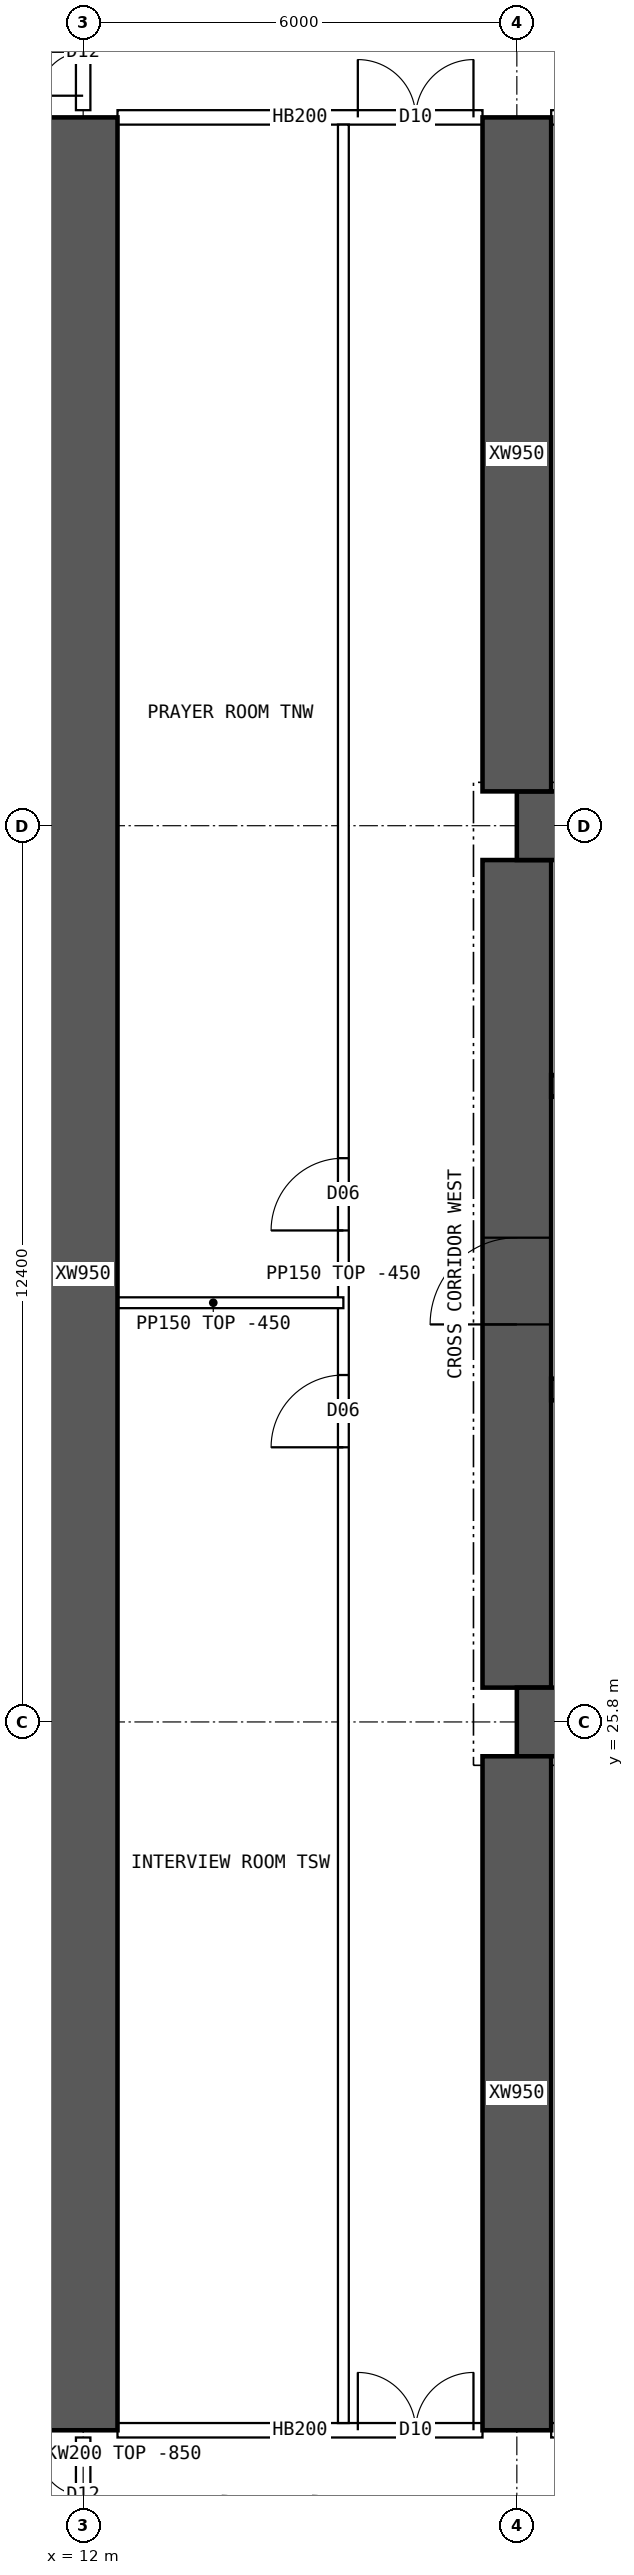
"""IFC4 building model, lengths in metres.
Left out: names, types, materials, properties, quantities, classifications, styles, units other than length and angle.
Written with IfcOpenShell. Run it as: python <this file> out.ifc"""

import sys

from ifc_helpers import new_model, si_unit, direction, frame, frame_2d, origin, place, context, subcontext, project, spatial, polyline, rectangle, outline, extrude, element, fill, save


model = new_model("IFC4")
c1 = context("Model", 3, precision=1e-05, world=origin(), true_north=direction((0.0, 1.0)))
c2 = subcontext(c1, "Body", "Model", "MODEL_VIEW")
j1 = project(units=[si_unit("LENGTHUNIT", "METRE"), si_unit("PLANEANGLEUNIT", "RADIAN")], contexts=[c1])
p1 = place(None, origin())
s1 = spatial("IfcSite", under=j1, at=p1, CompositionType="ELEMENT")
p2 = place(p1, origin())
s2 = spatial("IfcBuilding", under=s1, at=p2, CompositionType="ELEMENT")
p3 = place(p2, frame((0.0, 0.0, 80.65)))
s3 = spatial("IfcBuildingStorey", under=s2, at=p3, CompositionType="ELEMENT", Elevation=80.65)
for number, where, z_axis, x_axis in (
    (1, (18.0, 25.8, 0.0), (0.0, 0.0, 1.0), (1.0, 0.0, 0.0)),
    (2, (18.0, 38.2, 0.0), (0.0, 0.0, 1.0), (1.0, 0.0, 0.0)),
):
    element("IfcWall", number, at=place(p3, frame(where, z_axis=z_axis, x_axis=x_axis)), inside=s3, PredefinedType="SHEAR", context=c2, shape_type="SweptSolid", body=[
        extrude(rectangle(XDim=48.0, YDim=0.95, at=frame_2d((24.0, 0.0))), origin(), (0.0, 0.0, 1.0), 3.75),
    ])
p4 = place(p3, frame((18.0, 26.275, 0.0), z_axis=(0.0, 0.0, 1.0), x_axis=(0.0, 1.0, 0.0)))
e3 = element("IfcWall", 3, at=p4, inside=s3, PredefinedType="SHEAR", context=c2, shape_type="SweptSolid", body=[
    extrude(rectangle(XDim=11.45, YDim=0.95, at=frame_2d((5.725, 0.0))), origin(), (0.0, 0.0, 1.0), 3.75),
])
p5 = place(p4, frame((5.025, 0.0, 0.0)))
e4 = element("IfcOpeningElement", 4, at=p5, cuts=e3, PredefinedType="OPENING", context=c2, shape_type="SweptSolid", body=[
    extrude(rectangle(XDim=1.2, YDim=2.1, at=frame_2d((0.6, 1.05))), frame((0.0, 0.485, 0.0), z_axis=(0.0, -1.0, 0.0), x_axis=(1.0, 0.0, 0.0)), (0.0, 0.0, 1.0), 0.97),
])
p6 = place(p3, frame((18.475, 30.4, 0.0), z_axis=(0.0, 0.0, 1.0), x_axis=(1.0, 0.0, 0.0)))
e5 = element("IfcWall", 5, at=p6, inside=s3, PredefinedType="SHEAR", context=c2, shape_type="SweptSolid", body=[
    extrude(rectangle(XDim=47.05, YDim=0.3, at=frame_2d((23.525, 0.0))), origin(), (0.0, 0.0, 1.0), 3.75),
])
p7 = place(p6, frame((0.4, 0.0, 0.0)))
e6 = element("IfcOpeningElement", 6, at=p7, cuts=e5, PredefinedType="OPENING", context=c2, shape_type="SweptSolid", body=[
    extrude(rectangle(XDim=1.0, YDim=2.1, at=frame_2d((0.5, 1.05))), frame((0.0, 0.16, 0.0), z_axis=(0.0, -1.0, 0.0), x_axis=(1.0, 0.0, 0.0)), (0.0, 0.0, 1.0), 0.32),
])
p8 = place(p6, frame((45.65, 0.0, 0.0)))
e7 = element("IfcOpeningElement", 7, at=p8, cuts=e5, PredefinedType="OPENING", context=c2, shape_type="SweptSolid", body=[
    extrude(rectangle(XDim=1.0, YDim=2.1, at=frame_2d((0.5, 1.05))), frame((0.0, 0.16, 0.0), z_axis=(0.0, -1.0, 0.0), x_axis=(1.0, 0.0, 0.0)), (0.0, 0.0, 1.0), 0.32),
])
p9 = place(p6, frame((8.275, 0.0, 0.0)))
e8 = element("IfcOpeningElement", 8, at=p9, cuts=e5, PredefinedType="OPENING", context=c2, shape_type="SweptSolid", body=[
    extrude(rectangle(XDim=1.1, YDim=2.1, at=frame_2d((0.55, 1.05))), frame((0.0, 0.16, 0.0), z_axis=(0.0, -1.0, 0.0), x_axis=(1.0, 0.0, 0.0)), (0.0, 0.0, 1.0), 0.32),
])
p10 = place(p6, frame((10.875, 0.0, 0.0)))
e9 = element("IfcOpeningElement", 9, at=p10, cuts=e5, PredefinedType="OPENING", context=c2, shape_type="SweptSolid", body=[
    extrude(rectangle(XDim=1.1, YDim=2.1, at=frame_2d((0.55, 1.05))), frame((0.0, 0.16, 0.0), z_axis=(0.0, -1.0, 0.0), x_axis=(1.0, 0.0, 0.0)), (0.0, 0.0, 1.0), 0.32),
])
p11 = place(p6, frame((13.475, 0.0, 0.0)))
e10 = element("IfcOpeningElement", 10, at=p11, cuts=e5, PredefinedType="OPENING", context=c2, shape_type="SweptSolid", body=[
    extrude(rectangle(XDim=1.1, YDim=2.1, at=frame_2d((0.55, 1.05))), frame((0.0, 0.16, 0.0), z_axis=(0.0, -1.0, 0.0), x_axis=(1.0, 0.0, 0.0)), (0.0, 0.0, 1.0), 0.32),
])
p12 = place(p6, frame((16.075, 0.0, 0.0)))
e11 = element("IfcOpeningElement", 11, at=p12, cuts=e5, PredefinedType="OPENING", context=c2, shape_type="SweptSolid", body=[
    extrude(rectangle(XDim=1.1, YDim=2.1, at=frame_2d((0.55, 1.05))), frame((0.0, 0.16, 0.0), z_axis=(0.0, -1.0, 0.0), x_axis=(1.0, 0.0, 0.0)), (0.0, 0.0, 1.0), 0.32),
])
p13 = place(p6, frame((30.142, 0.0, 0.0)))
e12 = element("IfcOpeningElement", 12, at=p13, cuts=e5, PredefinedType="OPENING", context=c2, shape_type="SweptSolid", body=[
    extrude(rectangle(XDim=1.1, YDim=2.1, at=frame_2d((0.55, 1.05))), frame((0.0, 0.16, 0.0), z_axis=(0.0, -1.0, 0.0), x_axis=(1.0, 0.0, 0.0)), (0.0, 0.0, 1.0), 0.32),
])
p14 = place(p6, frame((33.675, 0.0, 0.0)))
e13 = element("IfcOpeningElement", 13, at=p14, cuts=e5, PredefinedType="OPENING", context=c2, shape_type="SweptSolid", body=[
    extrude(rectangle(XDim=1.1, YDim=2.1, at=frame_2d((0.55, 1.05))), frame((0.0, 0.16, 0.0), z_axis=(0.0, -1.0, 0.0), x_axis=(1.0, 0.0, 0.0)), (0.0, 0.0, 1.0), 0.32),
])
p15 = place(p6, frame((37.208, 0.0, 0.0)))
e14 = element("IfcOpeningElement", 14, at=p15, cuts=e5, PredefinedType="OPENING", context=c2, shape_type="SweptSolid", body=[
    extrude(rectangle(XDim=1.1, YDim=2.1, at=frame_2d((0.55, 1.05))), frame((0.0, 0.16, 0.0), z_axis=(0.0, -1.0, 0.0), x_axis=(1.0, 0.0, 0.0)), (0.0, 0.0, 1.0), 0.32),
])
p16 = place(p3, frame((18.475, 34.6, 0.0), z_axis=(0.0, 0.0, 1.0), x_axis=(1.0, 0.0, 0.0)))
e15 = element("IfcWall", 15, at=p16, inside=s3, PredefinedType="SHEAR", context=c2, shape_type="SweptSolid", body=[
    extrude(rectangle(XDim=47.05, YDim=0.3, at=frame_2d((23.525, 0.0))), origin(), (0.0, 0.0, 1.0), 3.75),
])
p17 = place(p16, frame((0.9, 0.0, 0.0)))
e16 = element("IfcOpeningElement", 16, at=p17, cuts=e15, PredefinedType="OPENING", context=c2, shape_type="SweptSolid", body=[
    extrude(rectangle(XDim=1.1, YDim=2.1, at=frame_2d((0.55, 1.05))), frame((0.0, 0.16, 0.0), z_axis=(0.0, -1.0, 0.0), x_axis=(1.0, 0.0, 0.0)), (0.0, 0.0, 1.0), 0.32),
])
p18 = place(p16, frame((45.05, 0.0, 0.0)))
e17 = element("IfcOpeningElement", 17, at=p18, cuts=e15, PredefinedType="OPENING", context=c2, shape_type="SweptSolid", body=[
    extrude(rectangle(XDim=1.1, YDim=2.1, at=frame_2d((0.55, 1.05))), frame((0.0, 0.16, 0.0), z_axis=(0.0, -1.0, 0.0), x_axis=(1.0, 0.0, 0.0)), (0.0, 0.0, 1.0), 0.32),
])
p19 = place(p16, frame((4.125, 0.0, 0.0)))
e18 = element("IfcOpeningElement", 18, at=p19, cuts=e15, PredefinedType="OPENING", context=c2, shape_type="SweptSolid", body=[
    extrude(rectangle(XDim=0.9, YDim=2.1, at=frame_2d((0.45, 1.05))), frame((0.0, 0.16, 0.0), z_axis=(0.0, -1.0, 0.0), x_axis=(1.0, 0.0, 0.0)), (0.0, 0.0, 1.0), 0.32),
])
p20 = place(p16, frame((42.025, 0.0, 0.0)))
e19 = element("IfcOpeningElement", 19, at=p20, cuts=e15, PredefinedType="OPENING", context=c2, shape_type="SweptSolid", body=[
    extrude(rectangle(XDim=0.9, YDim=2.1, at=frame_2d((0.45, 1.05))), frame((0.0, 0.16, 0.0), z_axis=(0.0, -1.0, 0.0), x_axis=(1.0, 0.0, 0.0)), (0.0, 0.0, 1.0), 0.32),
])
p21 = place(p16, frame((8.9, 0.0, 0.0)))
e20 = element("IfcOpeningElement", 20, at=p21, cuts=e15, PredefinedType="OPENING", context=c2, shape_type="SweptSolid", body=[
    extrude(rectangle(XDim=0.9, YDim=2.1, at=frame_2d((0.45, 1.05))), frame((0.0, 0.16, 0.0), z_axis=(0.0, -1.0, 0.0), x_axis=(1.0, 0.0, 0.0)), (0.0, 0.0, 1.0), 0.32),
])
p22 = place(p16, frame((12.874, 0.0, 0.0)))
e21 = element("IfcOpeningElement", 21, at=p22, cuts=e15, PredefinedType="OPENING", context=c2, shape_type="SweptSolid", body=[
    extrude(rectangle(XDim=0.9, YDim=2.1, at=frame_2d((0.45, 1.05))), frame((0.0, 0.16, 0.0), z_axis=(0.0, -1.0, 0.0), x_axis=(1.0, 0.0, 0.0)), (0.0, 0.0, 1.0), 0.32),
])
p23 = place(p16, frame((16.521, 0.0, 0.0)))
e22 = element("IfcOpeningElement", 22, at=p23, cuts=e15, PredefinedType="OPENING", context=c2, shape_type="SweptSolid", body=[
    extrude(rectangle(XDim=0.9, YDim=2.1, at=frame_2d((0.45, 1.05))), frame((0.0, 0.16, 0.0), z_axis=(0.0, -1.0, 0.0), x_axis=(1.0, 0.0, 0.0)), (0.0, 0.0, 1.0), 0.32),
])
p24 = place(p16, frame((20.28, 0.0, 0.0)))
e23 = element("IfcOpeningElement", 23, at=p24, cuts=e15, PredefinedType="OPENING", context=c2, shape_type="SweptSolid", body=[
    extrude(rectangle(XDim=0.9, YDim=2.1, at=frame_2d((0.45, 1.05))), frame((0.0, 0.16, 0.0), z_axis=(0.0, -1.0, 0.0), x_axis=(1.0, 0.0, 0.0)), (0.0, 0.0, 1.0), 0.32),
])
p25 = place(p16, frame((24.686, 0.0, 0.0)))
e24 = element("IfcOpeningElement", 24, at=p25, cuts=e15, PredefinedType="OPENING", context=c2, shape_type="SweptSolid", body=[
    extrude(rectangle(XDim=0.9, YDim=2.1, at=frame_2d((0.45, 1.05))), frame((0.0, 0.16, 0.0), z_axis=(0.0, -1.0, 0.0), x_axis=(1.0, 0.0, 0.0)), (0.0, 0.0, 1.0), 0.32),
])
p26 = place(p16, frame((27.483, 0.0, 0.0)))
e25 = element("IfcOpeningElement", 25, at=p26, cuts=e15, PredefinedType="OPENING", context=c2, shape_type="SweptSolid", body=[
    extrude(rectangle(XDim=0.9, YDim=2.1, at=frame_2d((0.45, 1.05))), frame((0.0, 0.16, 0.0), z_axis=(0.0, -1.0, 0.0), x_axis=(1.0, 0.0, 0.0)), (0.0, 0.0, 1.0), 0.32),
])
p27 = place(p16, frame((29.45, 0.0, 0.0)))
e26 = element("IfcOpeningElement", 26, at=p27, cuts=e15, PredefinedType="OPENING", context=c2, shape_type="SweptSolid", body=[
    extrude(rectangle(XDim=0.9, YDim=2.1, at=frame_2d((0.45, 1.05))), frame((0.0, 0.16, 0.0), z_axis=(0.0, -1.0, 0.0), x_axis=(1.0, 0.0, 0.0)), (0.0, 0.0, 1.0), 0.32),
])
p28 = place(p16, frame((31.882, 0.0, 0.0)))
e27 = element("IfcOpeningElement", 27, at=p28, cuts=e15, PredefinedType="OPENING", context=c2, shape_type="SweptSolid", body=[
    extrude(rectangle(XDim=0.9, YDim=2.1, at=frame_2d((0.45, 1.05))), frame((0.0, 0.16, 0.0), z_axis=(0.0, -1.0, 0.0), x_axis=(1.0, 0.0, 0.0)), (0.0, 0.0, 1.0), 0.32),
])
p29 = place(p16, frame((34.617, 0.0, 0.0)))
e28 = element("IfcOpeningElement", 28, at=p29, cuts=e15, PredefinedType="OPENING", context=c2, shape_type="SweptSolid", body=[
    extrude(rectangle(XDim=0.9, YDim=2.1, at=frame_2d((0.45, 1.05))), frame((0.0, 0.16, 0.0), z_axis=(0.0, -1.0, 0.0), x_axis=(1.0, 0.0, 0.0)), (0.0, 0.0, 1.0), 0.32),
])
p30 = place(p16, frame((37.656, 0.0, 0.0)))
e29 = element("IfcOpeningElement", 29, at=p30, cuts=e15, PredefinedType="OPENING", context=c2, shape_type="SweptSolid", body=[
    extrude(rectangle(XDim=0.9, YDim=2.1, at=frame_2d((0.45, 1.05))), frame((0.0, 0.16, 0.0), z_axis=(0.0, -1.0, 0.0), x_axis=(1.0, 0.0, 0.0)), (0.0, 0.0, 1.0), 0.32),
])
p31 = place(p3, frame((12.0, 16.0, 0.0), z_axis=(0.0, 0.0, 1.0), x_axis=(0.0, 1.0, 0.0)))
e30 = element("IfcWall", 30, at=p31, inside=s3, PredefinedType="SHEAR", context=c2, shape_type="SweptSolid", body=[
    extrude(rectangle(XDim=32.0, YDim=0.95, at=frame_2d((16.0, 0.0))), origin(), (0.0, 0.0, 1.0), 3.75),
])
for number, where, z_axis, x_axis in (
    (31, (18.0, 16.0, 0.0), (0.0, 0.0, 1.0), (0.0, 1.0, 0.0)),
    (32, (18.0, 38.675, 0.0), (0.0, 0.0, 1.0), (0.0, 1.0, 0.0)),
):
    element("IfcWall", number, at=place(p3, frame(where, z_axis=z_axis, x_axis=x_axis)), inside=s3, PredefinedType="SHEAR", context=c2, shape_type="SweptSolid", body=[
        extrude(rectangle(XDim=9.325, YDim=0.95, at=frame_2d((4.663, 0.0))), origin(), (0.0, 0.0, 1.0), 3.75),
    ])
p32 = place(p3, frame((12.475, 16.0, 0.0), z_axis=(0.0, 0.0, 1.0), x_axis=(1.0, 0.0, 0.0)))
e33 = element("IfcWall", 33, at=p32, inside=s3, PredefinedType="SOLIDWALL", context=c2, shape_type="SweptSolid", body=[
    extrude(rectangle(XDim=5.05, YDim=0.2, at=frame_2d((2.525, 0.0))), origin(), (0.0, 0.0, 1.0), 3.3),
])
p33 = place(p32, frame((3.325, 0.0, 0.0)))
e34 = element("IfcOpeningElement", 34, at=p33, cuts=e33, PredefinedType="OPENING", context=c2, shape_type="SweptSolid", body=[
    extrude(rectangle(XDim=1.6, YDim=2.1, at=frame_2d((0.8, 1.05))), frame((0.0, 0.11, 0.0), z_axis=(0.0, -1.0, 0.0), x_axis=(1.0, 0.0, 0.0)), (0.0, 0.0, 1.0), 0.22),
])
p34 = place(p3, frame((18.475, 16.0, 0.0), z_axis=(0.0, 0.0, 1.0), x_axis=(1.0, 0.0, 0.0)))
e35 = element("IfcWall", 35, at=p34, inside=s3, PredefinedType="SOLIDWALL", context=c2, shape_type="SweptSolid", body=[
    extrude(rectangle(XDim=5.05, YDim=0.2, at=frame_2d((2.525, 0.0))), origin(), (0.0, 0.0, 1.0), 3.3),
])
p35 = place(p34, frame((0.35, 0.0, 0.0)))
e36 = element("IfcOpeningElement", 36, at=p35, cuts=e35, PredefinedType="OPENING", context=c2, shape_type="SweptSolid", body=[
    extrude(rectangle(XDim=0.9, YDim=2.1, at=frame_2d((0.45, 1.05))), frame((0.0, 0.11, 0.0), z_axis=(0.0, -1.0, 0.0), x_axis=(1.0, 0.0, 0.0)), (0.0, 0.0, 1.0), 0.22),
])
p36 = place(p34, frame((3.215, 0.0, 0.0)))
e37 = element("IfcOpeningElement", 37, at=p36, cuts=e35, PredefinedType="OPENING", context=c2, shape_type="SweptSolid", body=[
    extrude(rectangle(XDim=0.9, YDim=2.1, at=frame_2d((0.45, 1.05))), frame((0.0, 0.11, 0.0), z_axis=(0.0, -1.0, 0.0), x_axis=(1.0, 0.0, 0.0)), (0.0, 0.0, 1.0), 0.22),
])
p37 = place(p3, frame((12.475, 48.0, 0.0), z_axis=(0.0, 0.0, 1.0), x_axis=(1.0, 0.0, 0.0)))
e38 = element("IfcWall", 38, at=p37, inside=s3, PredefinedType="SOLIDWALL", context=c2, shape_type="SweptSolid", body=[
    extrude(rectangle(XDim=5.05, YDim=0.2, at=frame_2d((2.525, 0.0))), origin(), (0.0, 0.0, 1.0), 3.3),
])
p38 = place(p37, frame((3.325, 0.0, 0.0)))
e39 = element("IfcOpeningElement", 39, at=p38, cuts=e38, PredefinedType="OPENING", context=c2, shape_type="SweptSolid", body=[
    extrude(rectangle(XDim=1.6, YDim=2.1, at=frame_2d((0.8, 1.05))), frame((0.0, 0.11, 0.0), z_axis=(0.0, -1.0, 0.0), x_axis=(1.0, 0.0, 0.0)), (0.0, 0.0, 1.0), 0.22),
])
p39 = place(p3, frame((18.475, 48.0, 0.0), z_axis=(0.0, 0.0, 1.0), x_axis=(1.0, 0.0, 0.0)))
e40 = element("IfcWall", 40, at=p39, inside=s3, PredefinedType="SOLIDWALL", context=c2, shape_type="SweptSolid", body=[
    extrude(rectangle(XDim=5.05, YDim=0.2, at=frame_2d((2.525, 0.0))), origin(), (0.0, 0.0, 1.0), 3.3),
])
p40 = place(p39, frame((0.8, 0.0, 0.0)))
e41 = element("IfcOpeningElement", 41, at=p40, cuts=e40, PredefinedType="OPENING", context=c2, shape_type="SweptSolid", body=[
    extrude(rectangle(XDim=1.0, YDim=2.1, at=frame_2d((0.5, 1.05))), frame((0.0, 0.11, 0.0), z_axis=(0.0, -1.0, 0.0), x_axis=(1.0, 0.0, 0.0)), (0.0, 0.0, 1.0), 0.22),
])
p41 = place(p3, frame((15.6, 16.1, 0.0), z_axis=(0.0, 0.0, 1.0), x_axis=(0.0, 1.0, 0.0)))
e42 = element("IfcWall", 42, at=p41, inside=s3, PredefinedType="PARTITIONING", context=c2, shape_type="SweptSolid", body=[
    extrude(rectangle(XDim=31.8, YDim=0.15, at=frame_2d((15.9, 0.0))), origin(), (0.0, 0.0, 1.0), 3.3),
])
p42 = place(p41, frame((13.5, 0.0, 0.0)))
e43 = element("IfcOpeningElement", 43, at=p42, cuts=e42, PredefinedType="OPENING", context=c2, shape_type="SweptSolid", body=[
    extrude(rectangle(XDim=1.0, YDim=2.1, at=frame_2d((0.5, 1.05))), frame((0.0, 0.085, 0.0), z_axis=(0.0, -1.0, 0.0), x_axis=(1.0, 0.0, 0.0)), (0.0, 0.0, 1.0), 0.17),
])
p43 = place(p41, frame((16.5, 0.0, 0.0)))
e44 = element("IfcOpeningElement", 44, at=p43, cuts=e42, PredefinedType="OPENING", context=c2, shape_type="SweptSolid", body=[
    extrude(rectangle(XDim=1.0, YDim=2.1, at=frame_2d((0.5, 1.05))), frame((0.0, 0.085, 0.0), z_axis=(0.0, -1.0, 0.0), x_axis=(1.0, 0.0, 0.0)), (0.0, 0.0, 1.0), 0.17),
])
p44 = place(p3, frame((12.0, 31.6, 0.0), z_axis=(0.0, 0.0, 1.0), x_axis=(1.0, 0.0, 0.0)))
e45 = element("IfcWall", 45, at=p44, inside=s3, PredefinedType="PARTITIONING", context=c2, shape_type="SweptSolid", body=[
    extrude(rectangle(XDim=3.6, YDim=0.15, at=frame_2d((1.8, 0.0))), origin(), (0.0, 0.0, 1.0), 3.3),
])
p45 = place(p3, frame((3.905, 30.85, 0.0), z_axis=(0.0, 0.0, 1.0), x_axis=(1.0, 0.0, 0.0)))
e46 = element("IfcWall", 46, at=p45, inside=s3, PredefinedType="PARTITIONING", context=c2, shape_type="SweptSolid", body=[
    extrude(outline(polyline([(0.0, 0.0), (8.02, 0.0), (8.02, 3.3), (2.397, 3.3), (2.395, 2.85), (1.797, 2.85), (1.795, 3.3), (0.0, 3.3), (0.0, 0.0)])), frame((0.0, 0.075, 0.0), z_axis=(0.0, -1.0, 0.0), x_axis=(1.0, 0.0, 0.0)), (0.0, 0.0, 1.0), 0.15),
])
p46 = place(p3, frame((12.0, 14.3, 0.0), z_axis=(0.0, 0.0, 1.0), x_axis=(0.0, 1.0, 0.0)))
e47 = element("IfcWall", 47, at=p46, inside=s3, PredefinedType="SOLIDWALL", context=c2, shape_type="SweptSolid", body=[
    extrude(outline(polyline([(0.0, 0.0), (1.6, 0.0), (1.6, 2.9), (0.0, 2.9), (0.0, 0.0)])), frame((0.0, 0.1, 0.0), z_axis=(0.0, -1.0, 0.0), x_axis=(1.0, 0.0, 0.0)), (0.0, 0.0, 1.0), 0.2),
])
p47 = place(p46, frame((0.2, 0.0, 0.0)))
e48 = element("IfcOpeningElement", 48, at=p47, cuts=e47, PredefinedType="OPENING", context=c2, shape_type="SweptSolid", body=[
    extrude(rectangle(XDim=1.2, YDim=2.1, at=frame_2d((0.6, 1.05))), frame((0.0, 0.11, 0.0), z_axis=(0.0, -1.0, 0.0), x_axis=(1.0, 0.0, 0.0)), (0.0, 0.0, 1.0), 0.22),
])
p48 = place(p3, frame((12.0, 48.1, 0.0), z_axis=(0.0, 0.0, 1.0), x_axis=(0.0, 1.0, 0.0)))
e49 = element("IfcWall", 49, at=p48, inside=s3, PredefinedType="SOLIDWALL", context=c2, shape_type="SweptSolid", body=[
    extrude(outline(polyline([(0.0, 0.0), (1.6, 0.0), (1.6, 2.9), (0.0, 2.9), (0.0, 0.0)])), frame((0.0, 0.1, 0.0), z_axis=(0.0, -1.0, 0.0), x_axis=(1.0, 0.0, 0.0)), (0.0, 0.0, 1.0), 0.2),
])
p49 = place(p48, frame((0.2, 0.0, 0.0)))
e50 = element("IfcOpeningElement", 50, at=p49, cuts=e49, PredefinedType="OPENING", context=c2, shape_type="SweptSolid", body=[
    extrude(rectangle(XDim=1.2, YDim=2.1, at=frame_2d((0.6, 1.05))), frame((0.0, 0.11, 0.0), z_axis=(0.0, -1.0, 0.0), x_axis=(1.0, 0.0, 0.0)), (0.0, 0.0, 1.0), 0.22),
])
p50 = place(p5, origin())
e51 = element("IfcDoor", 51, at=p50, inside=s3, OperationType="SINGLE_SWING_LEFT", PredefinedType="DOOR", context=c2, shape_type="SweptSolid", body=[
    extrude(rectangle(XDim=1.2, YDim=2.1, at=frame_2d((0.6, 1.05))), frame((0.0, 0.025, 0.0), z_axis=(0.0, -1.0, 0.0), x_axis=(1.0, 0.0, 0.0)), (0.0, 0.0, 1.0), 0.05),
])
fill(e4, e51)
p51 = place(p33, origin())
e52 = element("IfcDoor", 52, at=p51, inside=s3, OperationType="DOUBLE_DOOR_SINGLE_SWING", PredefinedType="DOOR", context=c2, shape_type="SweptSolid", body=[
    extrude(rectangle(XDim=1.6, YDim=2.1, at=frame_2d((0.8, 1.05))), frame((0.0, 0.025, 0.0), z_axis=(0.0, -1.0, 0.0), x_axis=(1.0, 0.0, 0.0)), (0.0, 0.0, 1.0), 0.05),
])
fill(e34, e52)
p52 = place(p38, origin())
e53 = element("IfcDoor", 53, at=p52, inside=s3, OperationType="DOUBLE_DOOR_SINGLE_SWING", PredefinedType="DOOR", context=c2, shape_type="SweptSolid", body=[
    extrude(rectangle(XDim=1.6, YDim=2.1, at=frame_2d((0.8, 1.05))), frame((0.0, 0.025, 0.0), z_axis=(0.0, -1.0, 0.0), x_axis=(1.0, 0.0, 0.0)), (0.0, 0.0, 1.0), 0.05),
])
fill(e39, e53)
p53 = place(p42, origin())
e54 = element("IfcDoor", 54, at=p53, inside=s3, OperationType="SINGLE_SWING_LEFT", PredefinedType="DOOR", context=c2, shape_type="SweptSolid", body=[
    extrude(rectangle(XDim=1.0, YDim=2.1, at=frame_2d((0.5, 1.05))), frame((0.0, 0.025, 0.0), z_axis=(0.0, -1.0, 0.0), x_axis=(1.0, 0.0, 0.0)), (0.0, 0.0, 1.0), 0.05),
])
fill(e43, e54)
p54 = place(p43, origin())
e55 = element("IfcDoor", 55, at=p54, inside=s3, OperationType="SINGLE_SWING_LEFT", PredefinedType="DOOR", context=c2, shape_type="SweptSolid", body=[
    extrude(rectangle(XDim=1.0, YDim=2.1, at=frame_2d((0.5, 1.05))), frame((0.0, 0.025, 0.0), z_axis=(0.0, -1.0, 0.0), x_axis=(1.0, 0.0, 0.0)), (0.0, 0.0, 1.0), 0.05),
])
fill(e44, e55)
p55 = place(p47, origin())
e56 = element("IfcDoor", 56, at=p55, inside=s3, OperationType="DOUBLE_DOOR_SINGLE_SWING", PredefinedType="DOOR", context=c2, shape_type="SweptSolid", body=[
    extrude(rectangle(XDim=1.2, YDim=2.1, at=frame_2d((0.6, 1.05))), frame((0.0, 0.025, 0.0), z_axis=(0.0, -1.0, 0.0), x_axis=(1.0, 0.0, 0.0)), (0.0, 0.0, 1.0), 0.05),
])
fill(e48, e56)
p56 = place(p49, origin())
e57 = element("IfcDoor", 57, at=p56, inside=s3, OperationType="DOUBLE_DOOR_SINGLE_SWING", PredefinedType="DOOR", context=c2, shape_type="SweptSolid", body=[
    extrude(rectangle(XDim=1.2, YDim=2.1, at=frame_2d((0.6, 1.05))), frame((0.0, 0.025, 0.0), z_axis=(0.0, -1.0, 0.0), x_axis=(1.0, 0.0, 0.0)), (0.0, 0.0, 1.0), 0.05),
])
fill(e50, e57)
save(model, sys.argv[1])
